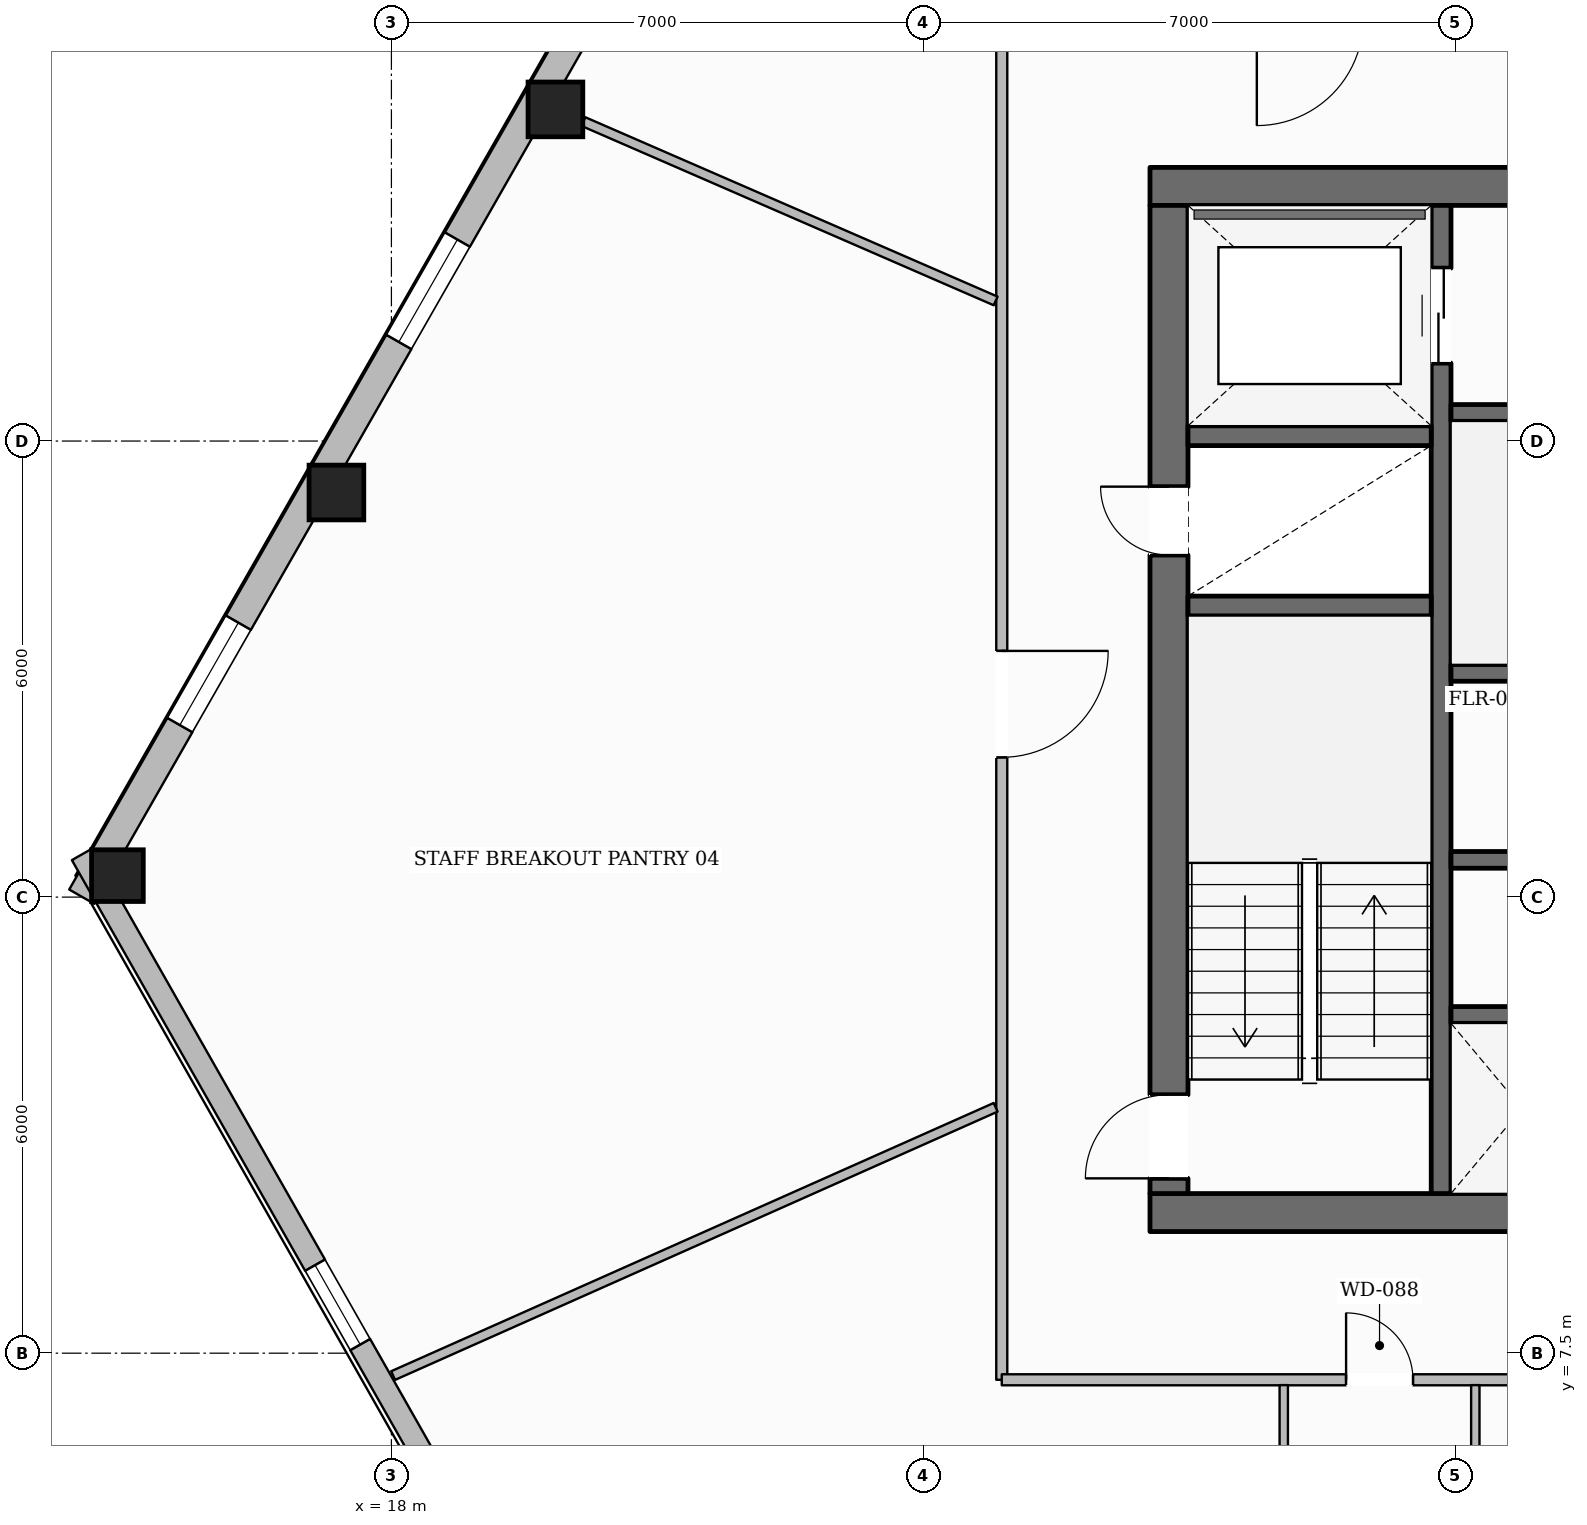
"""IFC4 building model, lengths in metres.
Left out: names, types, materials, properties, quantities, classifications, styles, units other than length and angle.
Written with IfcOpenShell. Run it as: python <this file> out.ifc"""

import sys

from ifc_helpers import new_model, si_unit, direction, frame, frame_2d, origin, origin_2d, place, context, subcontext, project, spatial, rectangle, hollow_rectangle, extrude, element, fill, save


model = new_model("IFC4")
c1 = context("Model", 3, precision=1e-05, world=origin(), true_north=direction((0.0, 1.0)))
c2 = subcontext(c1, "Body", "Model", "MODEL_VIEW")
j1 = project(units=[si_unit("LENGTHUNIT", "METRE"), si_unit("PLANEANGLEUNIT", "RADIAN")], contexts=[c1])
p1 = place(None, origin())
s1 = spatial("IfcSite", under=j1, at=p1, CompositionType="ELEMENT")
p2 = place(p1, origin())
s2 = spatial("IfcBuilding", under=s1, at=p2, CompositionType="ELEMENT")
p3 = place(p2, frame((0.0, 0.0, 89.35)))
s3 = spatial("IfcBuildingStorey", under=s2, at=p3, CompositionType="ELEMENT", Elevation=89.35)
p4 = place(p3, frame((27.98, 9.35, 0.0), z_axis=(0.0, 0.0, 1.0), x_axis=(1.0, 0.0, 0.0)))
e1 = element("IfcWall", 1, at=p4, inside=s3, PredefinedType="SOLIDWALL", context=c2, shape_type="SweptSolid", body=[
    extrude(rectangle(XDim=20.04, YDim=0.5, at=frame_2d((10.02, 0.0))), origin(), (0.0, 0.0, 1.0), 3.6),
])
p5 = place(p4, frame((10.52, 0.0, 0.0)))
e2 = element("IfcOpeningElement", 2, at=p5, cuts=e1, PredefinedType="OPENING", context=c2, shape_type="SweptSolid", body=[
    extrude(rectangle(XDim=1.4, YDim=2.2, at=frame_2d((0.7, 1.1))), frame((0.0, 0.26, 0.0), z_axis=(0.0, -1.0, 0.0), x_axis=(1.0, 0.0, 0.0)), (0.0, 0.0, 1.0), 0.52),
])
p6 = place(p3, frame((27.98, 22.85, 0.0), z_axis=(0.0, 0.0, 1.0), x_axis=(1.0, 0.0, 0.0)))
e3 = element("IfcWall", 3, at=p6, inside=s3, PredefinedType="SOLIDWALL", context=c2, shape_type="SweptSolid", body=[
    extrude(rectangle(XDim=20.04, YDim=0.5, at=frame_2d((10.02, 0.0))), origin(), (0.0, 0.0, 1.0), 3.6),
])
p7 = place(p6, frame((6.295, 0.0, 0.0)))
e4 = element("IfcOpeningElement", 4, at=p7, cuts=e3, PredefinedType="OPENING", context=c2, shape_type="SweptSolid", body=[
    extrude(rectangle(XDim=1.05, YDim=2.15, at=frame_2d((0.525, 1.075))), frame((0.0, 0.26, 0.0), z_axis=(0.0, -1.0, 0.0), x_axis=(1.0, 0.0, 0.0)), (0.0, 0.0, 1.0), 0.52),
])
p8 = place(p6, frame((12.695, 0.0, 0.0)))
e5 = element("IfcOpeningElement", 5, at=p8, cuts=e3, PredefinedType="OPENING", context=c2, shape_type="SweptSolid", body=[
    extrude(rectangle(XDim=1.05, YDim=2.15, at=frame_2d((0.525, 1.075))), frame((0.0, 0.26, 0.0), z_axis=(0.0, -1.0, 0.0), x_axis=(1.0, 0.0, 0.0)), (0.0, 0.0, 1.0), 0.52),
])
p9 = place(p3, frame((28.23, 9.6, 0.0), z_axis=(0.0, 0.0, 1.0), x_axis=(0.0, 1.0, 0.0)))
e6 = element("IfcWall", 6, at=p9, inside=s3, PredefinedType="SOLIDWALL", context=c2, shape_type="SweptSolid", body=[
    extrude(rectangle(XDim=13.0, YDim=0.5, at=frame_2d((6.5, 0.0))), origin(), (0.0, 0.0, 1.0), 3.6),
])
p10 = place(p9, frame((0.2, 0.0, 0.0)))
e7 = element("IfcOpeningElement", 7, at=p10, cuts=e6, PredefinedType="OPENING", context=c2, shape_type="SweptSolid", body=[
    extrude(rectangle(XDim=1.1, YDim=2.15, at=frame_2d((0.55, 1.075))), frame((0.0, 0.26, 0.0), z_axis=(0.0, -1.0, 0.0), x_axis=(1.0, 0.0, 0.0)), (0.0, 0.0, 1.0), 0.52),
])
p11 = place(p9, frame((8.4, 0.0, 0.0)))
e8 = element("IfcOpeningElement", 8, at=p11, cuts=e6, PredefinedType="OPENING", context=c2, shape_type="SweptSolid", body=[
    extrude(rectangle(XDim=0.9, YDim=2.1, at=frame_2d((0.45, 1.05))), frame((0.0, 0.26, 0.0), z_axis=(0.0, -1.0, 0.0), x_axis=(1.0, 0.0, 0.0)), (0.0, 0.0, 1.0), 0.52),
])
p12 = place(p3, frame((31.81, 9.6, 0.0), z_axis=(0.0, 0.0, 1.0), x_axis=(0.0, 1.0, 0.0)))
e9 = element("IfcWall", 9, at=p12, inside=s3, PredefinedType="SHEAR", context=c2, shape_type="SweptSolid", body=[
    extrude(rectangle(XDim=13.0, YDim=0.26, at=frame_2d((6.5, 0.0))), origin(), (0.0, 0.0, 1.0), 3.6),
])
p13 = place(p12, frame((10.925, 0.0, 0.0)))
e10 = element("IfcOpeningElement", 10, at=p13, cuts=e9, PredefinedType="OPENING", context=c2, shape_type="SweptSolid", body=[
    extrude(rectangle(XDim=1.25, YDim=2.25, at=frame_2d((0.625, 1.125))), frame((0.0, 0.14, 0.0), z_axis=(0.0, -1.0, 0.0), x_axis=(1.0, 0.0, 0.0)), (0.0, 0.0, 1.0), 0.28),
])
for number, where, z_axis, x_axis in (
    (11, (28.48, 17.33, 0.0), (0.0, 0.0, 1.0), (1.0, 0.0, 0.0)),
    (12, (28.48, 19.57, 0.0), (0.0, 0.0, 1.0), (1.0, 0.0, 0.0)),
):
    element("IfcWall", number, at=place(p3, frame(where, z_axis=z_axis, x_axis=x_axis)), inside=s3, PredefinedType="SHEAR", context=c2, shape_type="SweptSolid", body=[
        extrude(rectangle(XDim=3.2, YDim=0.26, at=frame_2d((1.6, 0.0))), origin(), (0.0, 0.0, 1.0), 3.6),
    ])
p14 = place(p3, frame((31.94, 19.87, 0.0), z_axis=(0.0, 0.0, 1.0), x_axis=(1.0, 0.0, 0.0)))
e13 = element("IfcWall", 13, at=p14, inside=s3, PredefinedType="SOLIDWALL", context=c2, shape_type="SweptSolid", body=[
    extrude(rectangle(XDim=12.12, YDim=0.22, at=frame_2d((6.06, 0.0))), origin(), (0.0, 0.0, 1.0), 3.6),
])
p15 = place(p14, frame((6.3, 0.0, 0.0)))
e14 = element("IfcOpeningElement", 14, at=p15, cuts=e13, PredefinedType="OPENING", context=c2, shape_type="SweptSolid", body=[
    extrude(rectangle(XDim=1.1, YDim=2.15, at=frame_2d((0.55, 1.075))), frame((0.0, 0.12, 0.0), z_axis=(0.0, -1.0, 0.0), x_axis=(1.0, 0.0, 0.0)), (0.0, 0.0, 1.0), 0.24),
])
p16 = place(p14, frame((8.01, 0.0, 0.0)))
e15 = element("IfcOpeningElement", 15, at=p16, cuts=e13, PredefinedType="OPENING", context=c2, shape_type="SweptSolid", body=[
    extrude(rectangle(XDim=0.9, YDim=2.1, at=frame_2d((0.45, 1.05))), frame((0.0, 0.12, 0.0), z_axis=(0.0, -1.0, 0.0), x_axis=(1.0, 0.0, 0.0)), (0.0, 0.0, 1.0), 0.24),
])
p17 = place(p14, frame((10.21, 0.0, 0.0)))
e16 = element("IfcOpeningElement", 16, at=p17, cuts=e13, PredefinedType="OPENING", context=c2, shape_type="SweptSolid", body=[
    extrude(rectangle(XDim=0.9, YDim=2.1, at=frame_2d((0.45, 1.05))), frame((0.0, 0.12, 0.0), z_axis=(0.0, -1.0, 0.0), x_axis=(1.0, 0.0, 0.0)), (0.0, 0.0, 1.0), 0.24),
])
p18 = place(p3, frame((31.94, 16.45, 0.0), z_axis=(0.0, 0.0, 1.0), x_axis=(1.0, 0.0, 0.0)))
e17 = element("IfcWall", 17, at=p18, inside=s3, PredefinedType="SOLIDWALL", context=c2, shape_type="SweptSolid", body=[
    extrude(rectangle(XDim=12.12, YDim=0.22, at=frame_2d((6.06, 0.0))), origin(), (0.0, 0.0, 1.0), 3.6),
])
p19 = place(p3, frame((31.94, 13.99, 0.0), z_axis=(0.0, 0.0, 1.0), x_axis=(1.0, 0.0, 0.0)))
e18 = element("IfcWall", 18, at=p19, inside=s3, PredefinedType="SOLIDWALL", context=c2, shape_type="SweptSolid", body=[
    extrude(rectangle(XDim=12.12, YDim=0.22, at=frame_2d((6.06, 0.0))), origin(), (0.0, 0.0, 1.0), 3.6),
])
p20 = place(p19, frame((2.51, 0.0, 0.0)))
e19 = element("IfcOpeningElement", 19, at=p20, cuts=e18, PredefinedType="OPENING", context=c2, shape_type="SweptSolid", body=[
    extrude(rectangle(XDim=0.9, YDim=2.1, at=frame_2d((0.45, 1.05))), frame((0.0, 0.12, 0.0), z_axis=(0.0, -1.0, 0.0), x_axis=(1.0, 0.0, 0.0)), (0.0, 0.0, 1.0), 0.24),
])
p21 = place(p19, frame((6.535, 0.0, 0.0)))
e20 = element("IfcOpeningElement", 20, at=p21, cuts=e18, PredefinedType="OPENING", context=c2, shape_type="SweptSolid", body=[
    extrude(rectangle(XDim=1.1, YDim=2.2, at=frame_2d((0.55, 1.1))), frame((0.0, 0.12, 0.0), z_axis=(0.0, -1.0, 0.0), x_axis=(1.0, 0.0, 0.0)), (0.0, 0.0, 1.0), 0.24),
])
p22 = place(p19, frame((8.585, 0.0, 0.0)))
e21 = element("IfcOpeningElement", 21, at=p22, cuts=e18, PredefinedType="OPENING", context=c2, shape_type="SweptSolid", body=[
    extrude(rectangle(XDim=1.1, YDim=2.2, at=frame_2d((0.55, 1.1))), frame((0.0, 0.12, 0.0), z_axis=(0.0, -1.0, 0.0), x_axis=(1.0, 0.0, 0.0)), (0.0, 0.0, 1.0), 0.24),
])
p23 = place(p19, frame((10.635, 0.0, 0.0)))
e22 = element("IfcOpeningElement", 22, at=p23, cuts=e18, PredefinedType="OPENING", context=c2, shape_type="SweptSolid", body=[
    extrude(rectangle(XDim=1.1, YDim=2.2, at=frame_2d((0.55, 1.1))), frame((0.0, 0.12, 0.0), z_axis=(0.0, -1.0, 0.0), x_axis=(1.0, 0.0, 0.0)), (0.0, 0.0, 1.0), 0.24),
])
p24 = place(p3, frame((31.94, 11.95, 0.0), z_axis=(0.0, 0.0, 1.0), x_axis=(1.0, 0.0, 0.0)))
e23 = element("IfcWall", 23, at=p24, inside=s3, PredefinedType="SOLIDWALL", context=c2, shape_type="SweptSolid", body=[
    extrude(rectangle(XDim=6.19, YDim=0.22, at=frame_2d((3.095, 0.0))), origin(), (0.0, 0.0, 1.0), 3.6),
])
for number, where, z_axis, x_axis in (
    (24, (20.158, 23.863, 0.0), (0.0, 0.0, 1.0), (1.0, 0.0, 0.0)),
    (25, (17.277, 18.823, 0.0), (0.0, 0.0, 1.0), (1.0, 0.0, 0.0)),
):
    element("IfcColumn", number, at=place(p3, frame(where, z_axis=z_axis, x_axis=x_axis)), inside=s3, PredefinedType="COLUMN", context=c2, shape_type="SweptSolid", body=[
        extrude(hollow_rectangle(XDim=0.72, YDim=0.72, WallThickness=0.032, at=origin_2d()), origin(), (0.0, 0.0, 1.0), 3.6),
    ])
p25 = place(p3, frame((14.396, 13.783, 0.0), z_axis=(0.0, 0.0, 1.0), x_axis=(1.0, 0.0, 0.0)))
e26 = element("IfcColumn", 26, at=p25, inside=s3, PredefinedType="COLUMN", context=c2, shape_type="SweptSolid", body=[
    extrude(hollow_rectangle(XDim=0.68, YDim=0.68, WallThickness=0.03, at=origin_2d()), origin(), (0.0, 0.0, 1.0), 3.6),
])
p26 = place(p3, frame((13.926, 13.506, 0.0), z_axis=(0.0, 0.0, 1.0), x_axis=(0.496286611319, 0.868158740914, 0.0)))
e27 = element("IfcWall", 27, at=p26, inside=s3, PredefinedType="STANDARD", context=c2, shape_type="SweptSolid", body=[
    extrude(rectangle(XDim=35.785, YDim=0.38, at=frame_2d((17.893, 0.0))), origin(), (0.0, 0.0, 1.0), 3.059),
])
p27 = place(p26, frame((31.63, 0.0, 0.65)))
e28 = element("IfcOpeningElement", 28, at=p27, cuts=e27, PredefinedType="OPENING", context=c2, shape_type="SweptSolid", body=[
    extrude(rectangle(XDim=1.55, YDim=1.75, at=frame_2d((0.775, 0.875))), frame((0.0, 0.2, 0.0), z_axis=(0.0, -1.0, 0.0), x_axis=(1.0, 0.0, 0.0)), (0.0, 0.0, 1.0), 0.4),
])
p28 = place(p26, frame((25.824, 0.0, 0.65)))
e29 = element("IfcOpeningElement", 29, at=p28, cuts=e27, PredefinedType="OPENING", context=c2, shape_type="SweptSolid", body=[
    extrude(rectangle(XDim=1.55, YDim=1.75, at=frame_2d((0.775, 0.875))), frame((0.0, 0.2, 0.0), z_axis=(0.0, -1.0, 0.0), x_axis=(1.0, 0.0, 0.0)), (0.0, 0.0, 1.0), 0.4),
])
p29 = place(p26, frame((20.018, 0.0, 0.65)))
e30 = element("IfcOpeningElement", 30, at=p29, cuts=e27, PredefinedType="OPENING", context=c2, shape_type="SweptSolid", body=[
    extrude(rectangle(XDim=1.55, YDim=1.75, at=frame_2d((0.775, 0.875))), frame((0.0, 0.2, 0.0), z_axis=(0.0, -1.0, 0.0), x_axis=(1.0, 0.0, 0.0)), (0.0, 0.0, 1.0), 0.4),
])
p30 = place(p26, frame((8.407, 0.0, 0.65)))
e31 = element("IfcOpeningElement", 31, at=p30, cuts=e27, PredefinedType="OPENING", context=c2, shape_type="SweptSolid", body=[
    extrude(rectangle(XDim=1.55, YDim=1.75, at=frame_2d((0.775, 0.875))), frame((0.0, 0.2, 0.0), z_axis=(0.0, -1.0, 0.0), x_axis=(1.0, 0.0, 0.0)), (0.0, 0.0, 1.0), 0.4),
])
p31 = place(p26, frame((2.601, 0.0, 0.65)))
e32 = element("IfcOpeningElement", 32, at=p31, cuts=e27, PredefinedType="OPENING", context=c2, shape_type="SweptSolid", body=[
    extrude(rectangle(XDim=1.55, YDim=1.75, at=frame_2d((0.775, 0.875))), frame((0.0, 0.2, 0.0), z_axis=(0.0, -1.0, 0.0), x_axis=(1.0, 0.0, 0.0)), (0.0, 0.0, 1.0), 0.4),
])
p32 = place(p3, frame((20.658, 2.21, 0.0), z_axis=(0.0, 0.0, 1.0), x_axis=(-0.493913076268, 0.869511284051, 0.0)))
e33 = element("IfcWall", 33, at=p32, inside=s3, PredefinedType="STANDARD", context=c2, shape_type="SweptSolid", body=[
    extrude(rectangle(XDim=13.629, YDim=0.3, at=frame_2d((6.815, 0.0))), origin(), (0.0, 0.0, 1.0), 3.059),
])
p33 = place(p32, frame((6.215, 0.0, 0.65)))
e34 = element("IfcOpeningElement", 34, at=p33, cuts=e33, PredefinedType="OPENING", context=c2, shape_type="SweptSolid", body=[
    extrude(rectangle(XDim=1.2, YDim=1.7, at=frame_2d((0.6, 0.85))), frame((0.0, 0.16, 0.0), z_axis=(0.0, -1.0, 0.0), x_axis=(1.0, 0.0, 0.0)), (0.0, 0.0, 1.0), 0.32),
])
p34 = place(p3, frame((26.03, 25.05, 0.0), z_axis=(0.0, 0.0, 1.0), x_axis=(0.0, -1.0, 0.0)))
e35 = element("IfcWall", 35, at=p34, inside=s3, PredefinedType="PARTITIONING", context=c2, shape_type="SweptSolid", body=[
    extrude(rectangle(XDim=17.9, YDim=0.145, at=frame_2d((8.95, 0.0))), origin(), (0.0, 0.0, 1.0), 3.288),
])
p35 = place(p34, frame((8.311, 0.0, 0.0)))
e36 = element("IfcOpeningElement", 36, at=p35, cuts=e35, PredefinedType="OPENING", context=c2, shape_type="SweptSolid", body=[
    extrude(rectangle(XDim=1.4, YDim=2.2, at=frame_2d((0.7, 1.1))), frame((0.0, 0.083, 0.0), z_axis=(0.0, -1.0, 0.0), x_axis=(1.0, 0.0, 0.0)), (0.0, 0.0, 1.0), 0.165),
])
p36 = place(p3, frame((26.03, 7.15, 0.0), z_axis=(0.0, 0.0, 1.0), x_axis=(1.0, 0.0, 0.0)))
e37 = element("IfcWall", 37, at=p36, inside=s3, PredefinedType="PARTITIONING", context=c2, shape_type="SweptSolid", body=[
    extrude(rectangle(XDim=23.94, YDim=0.145, at=frame_2d((11.97, 0.0))), origin(), (0.0, 0.0, 1.0), 3.6),
])
p37 = place(p36, frame((4.53, 0.0, 0.0)))
e38 = element("IfcOpeningElement", 38, at=p37, cuts=e37, PredefinedType="OPENING", context=c2, shape_type="SweptSolid", body=[
    extrude(rectangle(XDim=0.88, YDim=2.1, at=frame_2d((0.44, 1.05))), frame((0.0, 0.083, 0.0), z_axis=(0.0, -1.0, 0.0), x_axis=(1.0, 0.0, 0.0)), (0.0, 0.0, 1.0), 0.165),
])
p38 = place(p36, frame((7.05, 0.0, 0.0)))
e39 = element("IfcOpeningElement", 39, at=p38, cuts=e37, PredefinedType="OPENING", context=c2, shape_type="SweptSolid", body=[
    extrude(rectangle(XDim=0.88, YDim=2.1, at=frame_2d((0.44, 1.05))), frame((0.0, 0.083, 0.0), z_axis=(0.0, -1.0, 0.0), x_axis=(1.0, 0.0, 0.0)), (0.0, 0.0, 1.0), 0.165),
])
p39 = place(p36, frame((9.43, 0.0, 0.0)))
e40 = element("IfcOpeningElement", 40, at=p39, cuts=e37, PredefinedType="OPENING", context=c2, shape_type="SweptSolid", body=[
    extrude(rectangle(XDim=0.96, YDim=2.1, at=frame_2d((0.48, 1.05))), frame((0.0, 0.083, 0.0), z_axis=(0.0, -1.0, 0.0), x_axis=(1.0, 0.0, 0.0)), (0.0, 0.0, 1.0), 0.165),
])
p40 = place(p36, frame((14.632, 0.0, 0.0)))
e41 = element("IfcOpeningElement", 41, at=p40, cuts=e37, PredefinedType="OPENING", context=c2, shape_type="SweptSolid", body=[
    extrude(rectangle(XDim=1.4, YDim=2.2, at=frame_2d((0.7, 1.1))), frame((0.0, 0.083, 0.0), z_axis=(0.0, -1.0, 0.0), x_axis=(1.0, 0.0, 0.0)), (0.0, 0.0, 1.0), 0.165),
])
p41 = place(p3, frame((29.74, 4.5, 0.0), z_axis=(0.0, 0.0, 1.0), x_axis=(0.0, 1.0, 0.0)))
e42 = element("IfcWall", 42, at=p41, inside=s3, PredefinedType="PLUMBINGWALL", context=c2, shape_type="SweptSolid", body=[
    extrude(rectangle(XDim=2.58, YDim=0.11, at=frame_2d((1.29, 0.0))), origin(), (0.0, 0.0, 1.0), 3.6),
])
p42 = place(p3, frame((32.26, 4.5, 0.0), z_axis=(0.0, 0.0, 1.0), x_axis=(0.0, 1.0, 0.0)))
e43 = element("IfcWall", 43, at=p42, inside=s3, PredefinedType="PLUMBINGWALL", context=c2, shape_type="SweptSolid", body=[
    extrude(rectangle(XDim=2.58, YDim=0.11, at=frame_2d((1.29, 0.0))), origin(), (0.0, 0.0, 1.0), 3.141),
])
p43 = place(p3, frame((25.949, 21.343, 0.0), z_axis=(0.0, 0.0, 1.0), x_axis=(-0.916959775259, 0.398979661834, 0.0)))
e44 = element("IfcWall", 44, at=p43, inside=s3, PredefinedType="PARTITIONING", context=c2, shape_type="SweptSolid", body=[
    extrude(rectangle(XDim=5.915, YDim=0.125, at=frame_2d((2.958, 0.0))), origin(), (0.0, 0.0, 1.0), 3.141),
])
p44 = place(p3, frame((25.949, 10.735, 0.0), z_axis=(0.0, 0.0, 1.0), x_axis=(-0.913551473061, -0.406723131955, 0.0)))
e45 = element("IfcWall", 45, at=p44, inside=s3, PredefinedType="PARTITIONING", context=c2, shape_type="SweptSolid", body=[
    extrude(rectangle(XDim=8.677, YDim=0.125, at=frame_2d((4.339, 0.0))), origin(), (0.0, 0.0, 1.0), 3.6),
])
p45 = place(p30, origin())
e46 = element("IfcWindow", 46, at=p45, inside=s3, PartitioningType="SINGLE_PANEL", PredefinedType="WINDOW", context=c2, shape_type="SweptSolid", body=[
    extrude(rectangle(XDim=1.55, YDim=1.75, at=frame_2d((0.775, 0.875))), frame((0.0, 0.03, 0.0), z_axis=(0.0, -1.0, 0.0), x_axis=(1.0, 0.0, 0.0)), (0.0, 0.0, 1.0), 0.06),
])
fill(e31, e46)
p46 = place(p31, origin())
e47 = element("IfcWindow", 47, at=p46, inside=s3, PartitioningType="SINGLE_PANEL", PredefinedType="WINDOW", context=c2, shape_type="SweptSolid", body=[
    extrude(rectangle(XDim=1.55, YDim=1.75, at=frame_2d((0.775, 0.875))), frame((0.0, 0.03, 0.0), z_axis=(0.0, -1.0, 0.0), x_axis=(1.0, 0.0, 0.0)), (0.0, 0.0, 1.0), 0.06),
])
fill(e32, e47)
p47 = place(p33, origin())
e48 = element("IfcWindow", 48, at=p47, inside=s3, PartitioningType="SINGLE_PANEL", PredefinedType="WINDOW", context=c2, shape_type="SweptSolid", body=[
    extrude(rectangle(XDim=1.2, YDim=1.7, at=frame_2d((0.6, 0.85))), frame((0.0, 0.03, 0.0), z_axis=(0.0, -1.0, 0.0), x_axis=(1.0, 0.0, 0.0)), (0.0, 0.0, 1.0), 0.06),
])
fill(e34, e48)
p48 = place(p10, origin())
e49 = element("IfcDoor", 49, at=p48, inside=s3, OperationType="SINGLE_SWING_LEFT", PredefinedType="DOOR", context=c2, shape_type="SweptSolid", body=[
    extrude(rectangle(XDim=1.1, YDim=2.15, at=frame_2d((0.55, 1.075))), frame((0.0, 0.025, 0.0), z_axis=(0.0, -1.0, 0.0), x_axis=(1.0, 0.0, 0.0)), (0.0, 0.0, 1.0), 0.05),
])
fill(e7, e49)
p49 = place(p11, origin())
e50 = element("IfcDoor", 50, at=p49, inside=s3, OperationType="SINGLE_SWING_RIGHT", PredefinedType="DOOR", context=c2, shape_type="SweptSolid", body=[
    extrude(rectangle(XDim=0.9, YDim=2.1, at=frame_2d((0.45, 1.05))), frame((0.0, 0.025, 0.0), z_axis=(0.0, -1.0, 0.0), x_axis=(1.0, 0.0, 0.0)), (0.0, 0.0, 1.0), 0.05),
])
fill(e8, e50)
p50 = place(p13, origin())
e51 = element("IfcDoor", 51, at=p50, inside=s3, OperationType="DOUBLE_DOOR_SLIDING", PredefinedType="DOOR", context=c2, shape_type="SweptSolid", body=[
    extrude(rectangle(XDim=1.25, YDim=2.25, at=frame_2d((0.625, 1.125))), frame((0.0, 0.025, 0.0), z_axis=(0.0, -1.0, 0.0), x_axis=(1.0, 0.0, 0.0)), (0.0, 0.0, 1.0), 0.05),
])
fill(e10, e51)
p51 = place(p37, origin())
e52 = element("IfcDoor", 52, at=p51, inside=s3, OperationType="SINGLE_SWING_LEFT", PredefinedType="DOOR", context=c2, shape_type="SweptSolid", body=[
    extrude(rectangle(XDim=0.88, YDim=2.1, at=frame_2d((0.44, 1.05))), frame((0.0, 0.025, 0.0), z_axis=(0.0, -1.0, 0.0), x_axis=(1.0, 0.0, 0.0)), (0.0, 0.0, 1.0), 0.05),
])
fill(e38, e52)
p52 = place(p35, origin())
e53 = element("IfcDoor", 53, at=p52, inside=s3, OperationType="SINGLE_SWING_LEFT", PredefinedType="DOOR", context=c2, shape_type="SweptSolid", body=[
    extrude(rectangle(XDim=1.4, YDim=2.2, at=frame_2d((0.7, 1.1))), frame((0.0, 0.025, 0.0), z_axis=(0.0, -1.0, 0.0), x_axis=(1.0, 0.0, 0.0)), (0.0, 0.0, 1.0), 0.05),
])
fill(e36, e53)
save(model, sys.argv[1])
